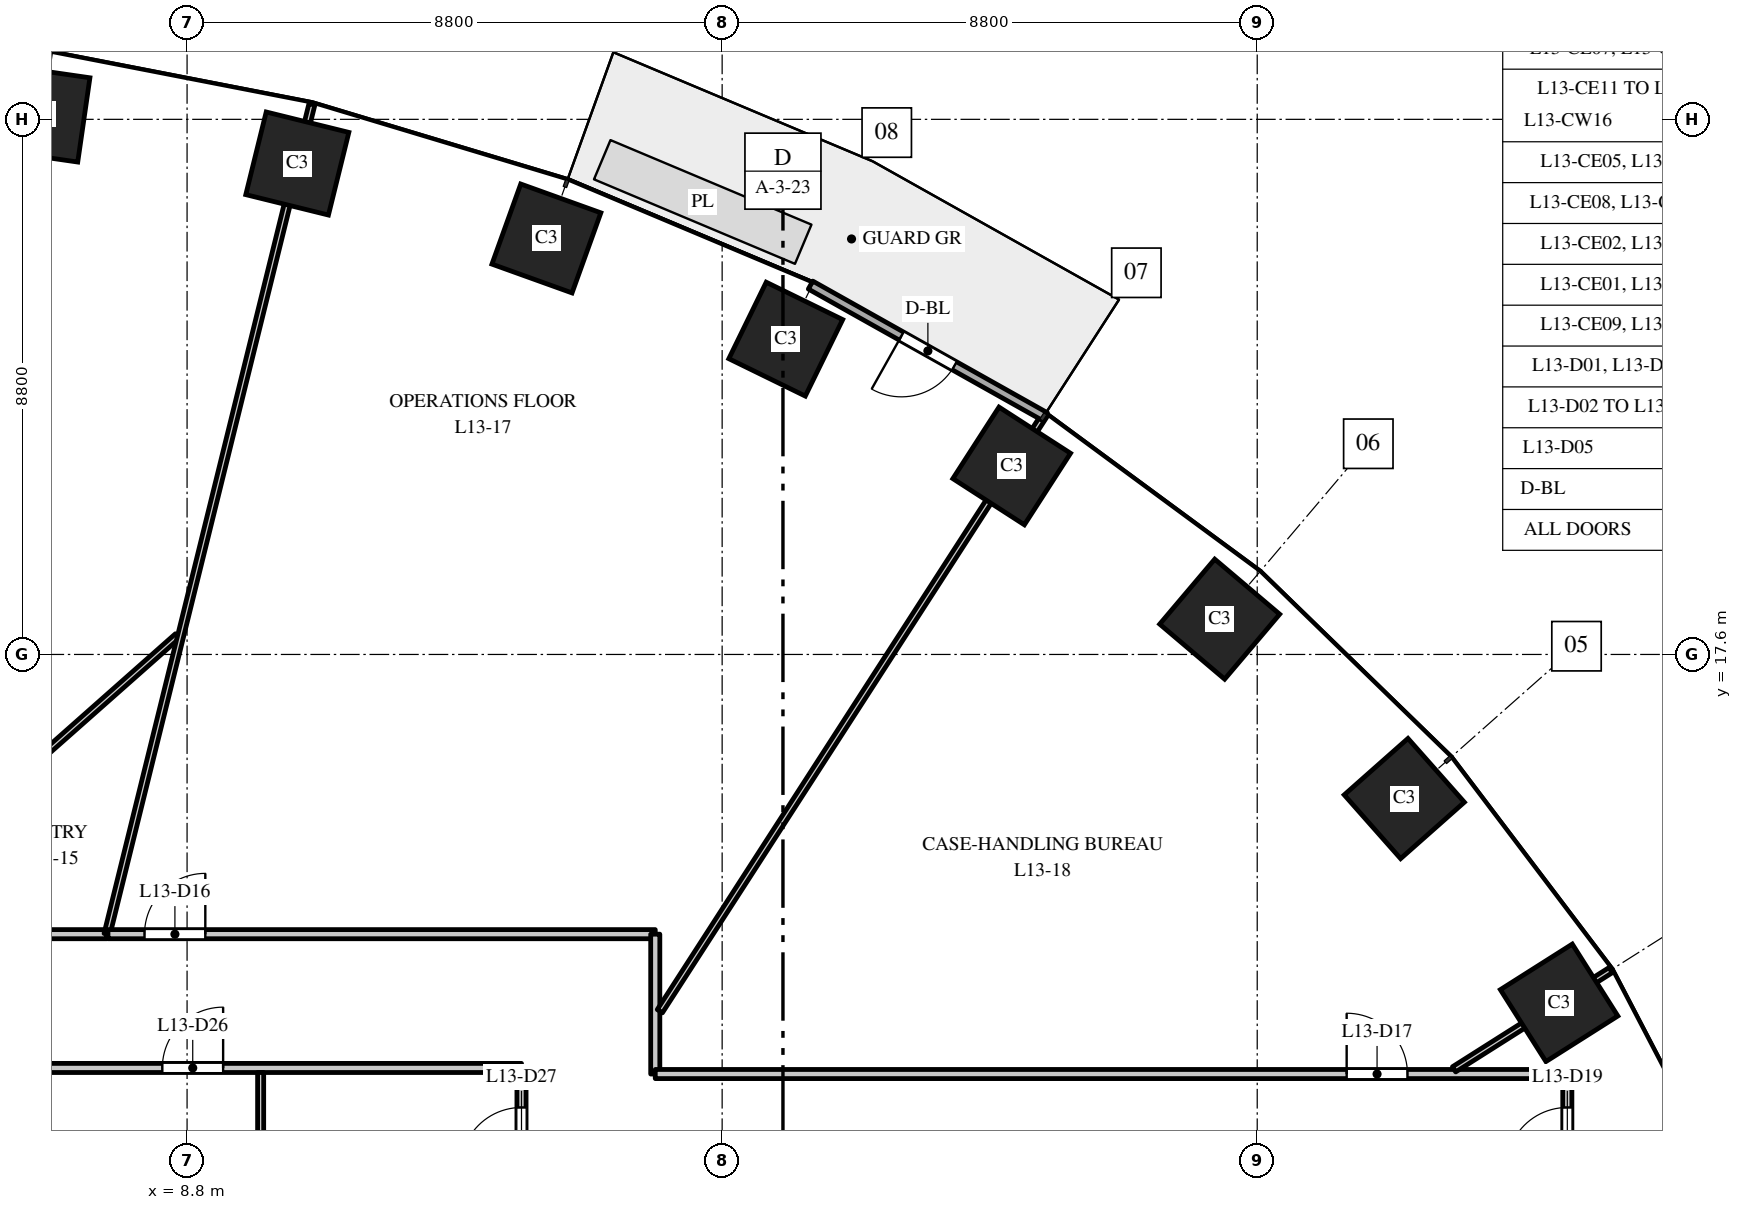
"""IFC4 building model, lengths in metres.
Left out: names, types, materials, properties, quantities, classifications, styles, units other than length and angle.
Written with IfcOpenShell. Run it as: python <this file> out.ifc"""

import sys

from ifc_helpers import new_model, si_unit, direction, frame, frame_2d, origin, origin_2d, place, context, subcontext, project, spatial, rectangle, extrude, element, fill, save


model = new_model("IFC4")
c1 = context("Model", 3, precision=1e-05, world=origin(), true_north=direction((0.0, 1.0)))
c2 = subcontext(c1, "Body", "Model", "MODEL_VIEW")
j1 = project(units=[si_unit("LENGTHUNIT", "METRE"), si_unit("PLANEANGLEUNIT", "RADIAN")], contexts=[c1])
p1 = place(None, origin())
s1 = spatial("IfcSite", under=j1, at=p1, CompositionType="ELEMENT")
p2 = place(p1, origin())
s2 = spatial("IfcBuilding", under=s1, at=p2, CompositionType="ELEMENT")
p3 = place(p2, frame((0.0, 0.0, 62.5)))
s3 = spatial("IfcBuildingStorey", under=s2, at=p3, CompositionType="ELEMENT", Elevation=62.5)
for number, where, z_axis, x_axis in (
    (1, (31.365, 11.871, 0.0), (0.0, 0.0, 1.0), (-0.535, 0.845, 0.0)),
    (2, (28.819, 15.23, 0.0), (0.0, 0.0, 1.0), (-0.663, 0.749, 0.0)),
    (3, (25.783, 18.18, 0.0), (0.0, 0.0, 1.0), (-0.763, 0.646, 0.0)),
    (4, (22.362, 20.7, 0.0), (0.0, 0.0, 1.0), (-0.84, 0.542, 0.0)),
    (5, (18.646, 22.785, 0.0), (0.0, 0.0, 1.0), (-0.898, 0.439, 0.0)),
    (6, (14.709, 24.441, 0.0), (0.0, 0.0, 1.0), (-0.941, 0.338, 0.0)),
    (7, (10.613, 25.674, 0.0), (0.0, 0.0, 1.0), (-0.971, 0.24, 0.0)),
    (8, (6.409, 26.491, 0.0), (0.0, 0.0, 1.0), (-0.99, 0.143, 0.0)),
):
    element("IfcColumn", number, at=place(p3, frame(where, z_axis=z_axis, x_axis=x_axis)), inside=s3, PredefinedType="COLUMN", context=c2, shape_type="SweptSolid", body=[
        extrude(rectangle(XDim=1.4, YDim=1.4, at=origin_2d()), origin(), (0.0, 0.0, 1.0), 4.0),
    ])
p4 = place(p3, frame((22.913, 21.509, 0.0), z_axis=(0.0, 0.0, 1.0), x_axis=(-0.872046572975, 0.489422899509, 0.0)))
e9 = element("IfcWall", 9, at=p4, inside=s3, PredefinedType="STANDARD", context=c2, shape_type="SweptSolid", body=[
    extrude(rectangle(XDim=4.426, YDim=0.15, at=frame_2d((2.213, 0.0))), origin(), (0.0, 0.0, 1.0), 3.7),
])
p5 = place(p4, frame((1.713, 0.0, 0.0)))
e10 = element("IfcOpeningElement", 10, at=p5, cuts=e9, PredefinedType="OPENING", context=c2, shape_type="SweptSolid", body=[
    extrude(rectangle(XDim=1.0, YDim=2.4, at=frame_2d((0.5, 1.2))), frame((0.0, 0.085, 0.0), z_axis=(0.0, -1.0, 0.0), x_axis=(1.0, 0.0, 0.0)), (0.0, 0.0, 1.0), 0.17),
])
p6 = place(p3, frame((-14.3, 10.8, 0.0), z_axis=(0.0, 0.0, 1.0), x_axis=(1.0, 0.0, 0.0)))
e11 = element("IfcWall", 11, at=p6, inside=s3, PredefinedType="PARTITIONING", context=c2, shape_type="SweptSolid", body=[
    extrude(rectangle(XDim=28.6, YDim=0.15, at=frame_2d((14.3, 0.0))), origin(), (0.0, 0.0, 1.0), 2.85),
])
p7 = place(p6, frame((10.66, 0.0, 0.0)))
e12 = element("IfcOpeningElement", 12, at=p7, cuts=e11, PredefinedType="OPENING", context=c2, shape_type="SweptSolid", body=[
    extrude(rectangle(XDim=1.0, YDim=2.1, at=frame_2d((0.5, 1.05))), frame((0.0, 0.085, 0.0), z_axis=(0.0, -1.0, 0.0), x_axis=(1.0, 0.0, 0.0)), (0.0, 0.0, 1.0), 0.17),
])
p8 = place(p6, frame((15.427, 0.0, 0.0)))
e13 = element("IfcOpeningElement", 13, at=p8, cuts=e11, PredefinedType="OPENING", context=c2, shape_type="SweptSolid", body=[
    extrude(rectangle(XDim=1.0, YDim=2.1, at=frame_2d((0.5, 1.05))), frame((0.0, 0.085, 0.0), z_axis=(0.0, -1.0, 0.0), x_axis=(1.0, 0.0, 0.0)), (0.0, 0.0, 1.0), 0.17),
])
p9 = place(p6, frame((22.693, 0.0, 0.0)))
e14 = element("IfcOpeningElement", 14, at=p9, cuts=e11, PredefinedType="OPENING", context=c2, shape_type="SweptSolid", body=[
    extrude(rectangle(XDim=1.0, YDim=2.1, at=frame_2d((0.5, 1.05))), frame((0.0, 0.085, 0.0), z_axis=(0.0, -1.0, 0.0), x_axis=(1.0, 0.0, 0.0)), (0.0, 0.0, 1.0), 0.17),
])
p10 = place(p3, frame((0.7, 13.0, 0.0), z_axis=(0.0, 0.0, 1.0), x_axis=(1.0, 0.0, 0.0)))
e15 = element("IfcWall", 15, at=p10, inside=s3, PredefinedType="PARTITIONING", context=c2, shape_type="SweptSolid", body=[
    extrude(rectangle(XDim=6.783, YDim=0.15, at=frame_2d((3.392, 0.0))), origin(), (0.0, 0.0, 1.0), 2.85),
])
p11 = place(p10, frame((0.754, 0.0, 0.0)))
e16 = element("IfcOpeningElement", 16, at=p11, cuts=e15, PredefinedType="OPENING", context=c2, shape_type="SweptSolid", body=[
    extrude(rectangle(XDim=1.0, YDim=2.1, at=frame_2d((0.5, 1.05))), frame((0.0, 0.085, 0.0), z_axis=(0.0, -1.0, 0.0), x_axis=(1.0, 0.0, 0.0)), (0.0, 0.0, 1.0), 0.17),
])
p12 = place(p10, frame((4.149, 0.0, 0.0)))
e17 = element("IfcOpeningElement", 17, at=p12, cuts=e15, PredefinedType="OPENING", context=c2, shape_type="SweptSolid", body=[
    extrude(rectangle(XDim=1.0, YDim=2.1, at=frame_2d((0.5, 1.05))), frame((0.0, 0.085, 0.0), z_axis=(0.0, -1.0, 0.0), x_axis=(1.0, 0.0, 0.0)), (0.0, 0.0, 1.0), 0.17),
])
p13 = place(p3, frame((3.187, 13.078, 0.0), z_axis=(0.0, 0.0, 1.0), x_axis=(0.749027274438, 0.662539162728, 0.0)))
e18 = element("IfcWall", 18, at=p13, inside=s3, PredefinedType="PARTITIONING", context=c2, shape_type="SweptSolid", body=[
    extrude(rectangle(XDim=7.283, YDim=0.1, at=frame_2d((3.642, 0.0))), origin(), (0.0, 0.0, 1.0), 2.85),
])
p14 = place(p3, frame((7.483, 13.0, 0.0), z_axis=(0.0, 0.0, 1.0), x_axis=(0.239763745499, 0.97083126564, 0.0)))
e19 = element("IfcWall", 19, at=p14, inside=s3, PredefinedType="PARTITIONING", context=c2, shape_type="SweptSolid", body=[
    extrude(rectangle(XDim=14.056, YDim=0.1, at=frame_2d((7.028, 0.0))), origin(), (0.0, 0.0, 1.0), 2.85),
])
p15 = place(p3, frame((7.499, 13.0, 0.0), z_axis=(0.0, 0.0, 1.0), x_axis=(1.0, 0.0, 0.0)))
e20 = element("IfcWall", 20, at=p15, inside=s3, PredefinedType="PARTITIONING", context=c2, shape_type="SweptSolid", body=[
    extrude(rectangle(XDim=9.001, YDim=0.15, at=frame_2d((4.5, 0.0))), origin(), (0.0, 0.0, 1.0), 2.85),
])
p16 = place(p15, frame((0.601, 0.0, 0.0)))
e21 = element("IfcOpeningElement", 21, at=p16, cuts=e20, PredefinedType="OPENING", context=c2, shape_type="SweptSolid", body=[
    extrude(rectangle(XDim=1.0, YDim=2.1, at=frame_2d((0.5, 1.05))), frame((0.0, 0.085, 0.0), z_axis=(0.0, -1.0, 0.0), x_axis=(1.0, 0.0, 0.0)), (0.0, 0.0, 1.0), 0.17),
])
p17 = place(p3, frame((10.01, -10.725, 0.0), z_axis=(0.0, 0.0, 1.0), x_axis=(0.0, 1.0, 0.0)))
e22 = element("IfcWall", 22, at=p17, inside=s3, PredefinedType="PARTITIONING", context=c2, shape_type="SweptSolid", body=[
    extrude(rectangle(XDim=21.45, YDim=0.1, at=frame_2d((10.725, 0.0))), origin(), (0.0, 0.0, 1.0), 2.75),
])
p18 = place(p3, frame((14.3, -10.8, 0.0), z_axis=(0.0, 0.0, 1.0), x_axis=(0.0, 1.0, 0.0)))
e23 = element("IfcWall", 23, at=p18, inside=s3, PredefinedType="PARTITIONING", context=c2, shape_type="SweptSolid", body=[
    extrude(rectangle(XDim=21.6, YDim=0.15, at=frame_2d((10.8, 0.0))), origin(), (0.0, 0.0, 1.0), 2.75),
])
p19 = place(p18, frame((19.95, 0.0, 0.0)))
e24 = element("IfcOpeningElement", 24, at=p19, cuts=e23, PredefinedType="OPENING", context=c2, shape_type="SweptSolid", body=[
    extrude(rectangle(XDim=1.0, YDim=2.1, at=frame_2d((0.5, 1.05))), frame((0.0, 0.085, 0.0), z_axis=(0.0, -1.0, 0.0), x_axis=(1.0, 0.0, 0.0)), (0.0, 0.0, 1.0), 0.17),
])
p20 = place(p3, frame((16.5, 10.7, 0.0), z_axis=(0.0, 0.0, 1.0), x_axis=(0.0, 1.0, 0.0)))
e25 = element("IfcWall", 25, at=p20, inside=s3, PredefinedType="PARTITIONING", context=c2, shape_type="SweptSolid", body=[
    extrude(rectangle(XDim=2.3, YDim=0.15, at=frame_2d((1.15, 0.0))), origin(), (0.0, 0.0, 1.0), 3.7),
])
p21 = place(p3, frame((16.5, 10.7, 0.0), z_axis=(0.0, 0.0, 1.0), x_axis=(1.0, 0.0, 0.0)))
e26 = element("IfcWall", 26, at=p21, inside=s3, PredefinedType="PARTITIONING", context=c2, shape_type="SweptSolid", body=[
    extrude(rectangle(XDim=15.0, YDim=0.15, at=frame_2d((7.5, 0.0))), origin(), (0.0, 0.0, 1.0), 2.75),
])
p22 = place(p21, frame((11.371, 0.0, 0.0)))
e27 = element("IfcOpeningElement", 27, at=p22, cuts=e26, PredefinedType="OPENING", context=c2, shape_type="SweptSolid", body=[
    extrude(rectangle(XDim=1.0, YDim=2.1, at=frame_2d((0.5, 1.05))), frame((0.0, 0.085, 0.0), z_axis=(0.0, -1.0, 0.0), x_axis=(1.0, 0.0, 0.0)), (0.0, 0.0, 1.0), 0.17),
])
p23 = place(p3, frame((16.575, 11.733, 0.0), z_axis=(0.0, 0.0, 1.0), x_axis=(0.54222594427, 0.840232720953, 0.0)))
e28 = element("IfcWall", 28, at=p23, inside=s3, PredefinedType="PARTITIONING", context=c2, shape_type="SweptSolid", body=[
    extrude(rectangle(XDim=11.674, YDim=0.1, at=frame_2d((5.837, 0.0))), origin(), (0.0, 0.0, 1.0), 3.7),
])
p24 = place(p3, frame((29.637, 10.777, 0.0), z_axis=(0.0, 0.0, 1.0), x_axis=(0.844810627195, 0.535065420467, 0.0)))
e29 = element("IfcWall", 29, at=p24, inside=s3, PredefinedType="PARTITIONING", context=c2, shape_type="SweptSolid", body=[
    extrude(rectangle(XDim=3.048, YDim=0.1, at=frame_2d((1.524, 0.0))), origin(), (0.0, 0.0, 1.0), 2.85),
])
p25 = place(p3, frame((31.5, 8.5, 0.0), z_axis=(0.0, 0.0, 1.0), x_axis=(0.0, 1.0, 0.0)))
e30 = element("IfcWall", 30, at=p25, inside=s3, PredefinedType="PARTITIONING", context=c2, shape_type="SweptSolid", body=[
    extrude(rectangle(XDim=2.2, YDim=0.15, at=frame_2d((1.1, 0.0))), origin(), (0.0, 0.0, 1.0), 2.85),
])
p26 = place(p25, frame((0.65, 0.0, 0.0)))
e31 = element("IfcOpeningElement", 31, at=p26, cuts=e30, PredefinedType="OPENING", context=c2, shape_type="SweptSolid", body=[
    extrude(rectangle(XDim=1.0, YDim=2.1, at=frame_2d((0.5, 1.05))), frame((0.0, 0.085, 0.0), z_axis=(0.0, -1.0, 0.0), x_axis=(1.0, 0.0, 0.0)), (0.0, 0.0, 1.0), 0.17),
])
p27 = place(p5, origin())
e32 = element("IfcDoor", 32, at=p27, inside=s3, OperationType="SINGLE_SWING_RIGHT", PredefinedType="DOOR", context=c2, shape_type="SweptSolid", body=[
    extrude(rectangle(XDim=1.0, YDim=2.4, at=frame_2d((0.5, 1.2))), frame((0.0, 0.025, 0.0), z_axis=(0.0, -1.0, 0.0), x_axis=(1.0, 0.0, 0.0)), (0.0, 0.0, 1.0), 0.05),
])
fill(e10, e32)
p28 = place(p16, origin())
e33 = element("IfcDoor", 33, at=p28, inside=s3, OperationType="SINGLE_SWING_RIGHT", PredefinedType="DOOR", context=c2, shape_type="SweptSolid", body=[
    extrude(rectangle(XDim=1.0, YDim=2.1, at=frame_2d((0.5, 1.05))), frame((0.0, 0.025, 0.0), z_axis=(0.0, -1.0, 0.0), x_axis=(1.0, 0.0, 0.0)), (0.0, 0.0, 1.0), 0.05),
])
fill(e21, e33)
p29 = place(p22, origin())
e34 = element("IfcDoor", 34, at=p29, inside=s3, OperationType="SINGLE_SWING_LEFT", PredefinedType="DOOR", context=c2, shape_type="SweptSolid", body=[
    extrude(rectangle(XDim=1.0, YDim=2.1, at=frame_2d((0.5, 1.05))), frame((0.0, 0.025, 0.0), z_axis=(0.0, -1.0, 0.0), x_axis=(1.0, 0.0, 0.0)), (0.0, 0.0, 1.0), 0.05),
])
fill(e27, e34)
p30 = place(p26, origin())
e35 = element("IfcDoor", 35, at=p30, inside=s3, OperationType="SINGLE_SWING_LEFT", PredefinedType="DOOR", context=c2, shape_type="SweptSolid", body=[
    extrude(rectangle(XDim=1.0, YDim=2.1, at=frame_2d((0.5, 1.05))), frame((0.0, 0.025, 0.0), z_axis=(0.0, -1.0, 0.0), x_axis=(1.0, 0.0, 0.0)), (0.0, 0.0, 1.0), 0.05),
])
fill(e31, e35)
p31 = place(p9, origin())
e36 = element("IfcDoor", 36, at=p31, inside=s3, OperationType="SINGLE_SWING_RIGHT", PredefinedType="DOOR", context=c2, shape_type="SweptSolid", body=[
    extrude(rectangle(XDim=1.0, YDim=2.1, at=frame_2d((0.5, 1.05))), frame((0.0, 0.025, 0.0), z_axis=(0.0, -1.0, 0.0), x_axis=(1.0, 0.0, 0.0)), (0.0, 0.0, 1.0), 0.05),
])
fill(e14, e36)
p32 = place(p19, origin())
e37 = element("IfcDoor", 37, at=p32, inside=s3, OperationType="SINGLE_SWING_LEFT", PredefinedType="DOOR", context=c2, shape_type="SweptSolid", body=[
    extrude(rectangle(XDim=1.0, YDim=2.1, at=frame_2d((0.5, 1.05))), frame((0.0, 0.025, 0.0), z_axis=(0.0, -1.0, 0.0), x_axis=(1.0, 0.0, 0.0)), (0.0, 0.0, 1.0), 0.05),
])
fill(e24, e37)
save(model, sys.argv[1])
